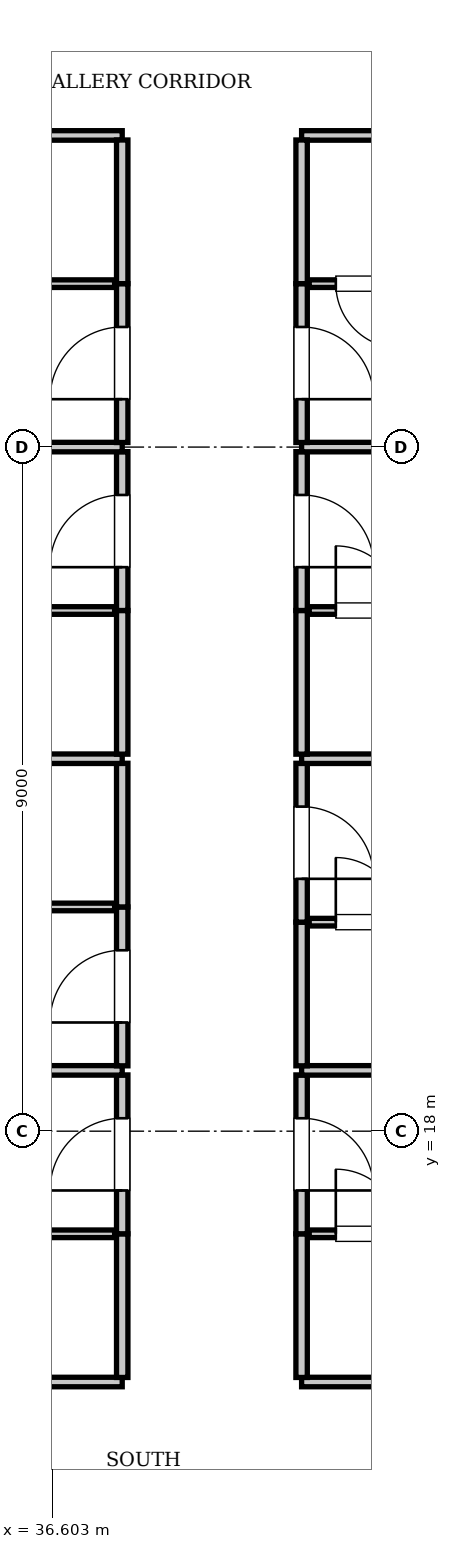
"""IFC4 building model, lengths in metres.
Left out: names, types, materials, properties, quantities, classifications, styles, units other than length and angle.
Written with IfcOpenShell. Run it as: python <this file> out.ifc"""

import sys

from ifc_helpers import new_model, si_unit, direction, frame, frame_2d, origin, place, context, subcontext, project, spatial, rectangle, extrude, element, fill, save


model = new_model("IFC4")
c1 = context("Model", 3, precision=1e-05, world=origin(), true_north=direction((0.0, 1.0)))
c2 = subcontext(c1, "Body", "Model", "MODEL_VIEW")
j1 = project(units=[si_unit("LENGTHUNIT", "METRE"), si_unit("PLANEANGLEUNIT", "RADIAN")], contexts=[c1])
p1 = place(None, origin())
s1 = spatial("IfcSite", under=j1, at=p1, CompositionType="ELEMENT")
p2 = place(p1, origin())
s2 = spatial("IfcBuilding", under=s1, at=p2, CompositionType="ELEMENT")
p3 = place(p2, frame((0.0, 0.0, 173.6)))
s3 = spatial("IfcBuildingStorey", under=s2, at=p3, CompositionType="ELEMENT", Elevation=173.6)
p4 = place(p3, frame((13.2, 14.7, 0.0), z_axis=(0.0, 0.0, 1.0), x_axis=(1.0, 0.0, 0.0)))
e1 = element("IfcWall", 1, at=p4, inside=s3, PredefinedType="PARTITIONING", context=c2, shape_type="SweptSolid", body=[
    extrude(rectangle(XDim=24.32, YDim=0.125, at=frame_2d((12.16, 0.0))), origin(), (0.0, 0.0, 1.0), 3.61),
])
p5 = place(p3, frame((39.88, 14.7, 0.0), z_axis=(0.0, 0.0, 1.0), x_axis=(1.0, 0.0, 0.0)))
e2 = element("IfcWall", 2, at=p5, inside=s3, PredefinedType="PARTITIONING", context=c2, shape_type="SweptSolid", body=[
    extrude(rectangle(XDim=22.52, YDim=0.125, at=frame_2d((11.26, 0.0))), origin(), (0.0, 0.0, 1.0), 3.61),
])
p6 = place(p3, frame((13.2, 31.1, 0.0), z_axis=(0.0, 0.0, 1.0), x_axis=(1.0, 0.0, 0.0)))
e3 = element("IfcWall", 3, at=p6, inside=s3, PredefinedType="PARTITIONING", context=c2, shape_type="SweptSolid", body=[
    extrude(rectangle(XDim=24.32, YDim=0.125, at=frame_2d((12.16, 0.0))), origin(), (0.0, 0.0, 1.0), 3.61),
])
p7 = place(p3, frame((39.88, 31.1, 0.0), z_axis=(0.0, 0.0, 1.0), x_axis=(1.0, 0.0, 0.0)))
e4 = element("IfcWall", 4, at=p7, inside=s3, PredefinedType="PARTITIONING", context=c2, shape_type="SweptSolid", body=[
    extrude(rectangle(XDim=22.52, YDim=0.125, at=frame_2d((11.26, 0.0))), origin(), (0.0, 0.0, 1.0), 3.61),
])
p8 = place(p3, frame((37.52, 14.76, 0.0), z_axis=(0.0, 0.0, 1.0), x_axis=(0.0, 1.0, 0.0)))
e5 = element("IfcWall", 5, at=p8, inside=s3, PredefinedType="PARTITIONING", context=c2, shape_type="SweptSolid", body=[
    extrude(rectangle(XDim=1.89, YDim=0.15, at=frame_2d((0.945, 0.0))), origin(), (0.0, 0.0, 1.0), 3.61),
])
p9 = place(p3, frame((37.52, 16.65, 0.0), z_axis=(0.0, 0.0, 1.0), x_axis=(0.0, 1.0, 0.0)))
e6 = element("IfcWall", 6, at=p9, inside=s3, PredefinedType="PARTITIONING", context=c2, shape_type="SweptSolid", body=[
    extrude(rectangle(XDim=2.09, YDim=0.15, at=frame_2d((1.045, 0.0))), origin(), (0.0, 0.0, 1.0), 3.61),
])
p10 = place(p9, frame((0.57, 0.0, 0.0)))
e7 = element("IfcOpeningElement", 7, at=p10, cuts=e6, PredefinedType="OPENING", context=c2, shape_type="SweptSolid", body=[
    extrude(rectangle(XDim=0.95, YDim=2.15, at=frame_2d((0.475, 1.075))), frame((0.0, 0.085, 0.0), z_axis=(0.0, -1.0, 0.0), x_axis=(1.0, 0.0, 0.0)), (0.0, 0.0, 1.0), 0.17),
])
p11 = place(p3, frame((35.12, 16.65, 0.0), z_axis=(0.0, 0.0, 1.0), x_axis=(1.0, 0.0, 0.0)))
e8 = element("IfcWall", 8, at=p11, inside=s3, PredefinedType="PARTITIONING", context=c2, shape_type="SweptSolid", body=[
    extrude(rectangle(XDim=2.3, YDim=0.1, at=frame_2d((1.15, 0.0))), origin(), (0.0, 0.0, 1.0), 3.61),
])
p12 = place(p11, frame((0.35, 0.0, 0.0)))
e9 = element("IfcOpeningElement", 9, at=p12, cuts=e8, PredefinedType="OPENING", context=c2, shape_type="SweptSolid", body=[
    extrude(rectangle(XDim=0.85, YDim=2.1, at=frame_2d((0.425, 1.05))), frame((0.0, 0.06, 0.0), z_axis=(0.0, -1.0, 0.0), x_axis=(1.0, 0.0, 0.0)), (0.0, 0.0, 1.0), 0.12),
])
p13 = place(p3, frame((39.88, 14.76, 0.0), z_axis=(0.0, 0.0, 1.0), x_axis=(0.0, 1.0, 0.0)))
e10 = element("IfcWall", 10, at=p13, inside=s3, PredefinedType="PARTITIONING", context=c2, shape_type="SweptSolid", body=[
    extrude(rectangle(XDim=1.89, YDim=0.15, at=frame_2d((0.945, 0.0))), origin(), (0.0, 0.0, 1.0), 3.61),
])
p14 = place(p3, frame((39.88, 16.65, 0.0), z_axis=(0.0, 0.0, 1.0), x_axis=(0.0, 1.0, 0.0)))
e11 = element("IfcWall", 11, at=p14, inside=s3, PredefinedType="PARTITIONING", context=c2, shape_type="SweptSolid", body=[
    extrude(rectangle(XDim=2.09, YDim=0.15, at=frame_2d((1.045, 0.0))), origin(), (0.0, 0.0, 1.0), 3.61),
])
p15 = place(p14, frame((0.57, 0.0, 0.0)))
e12 = element("IfcOpeningElement", 12, at=p15, cuts=e11, PredefinedType="OPENING", context=c2, shape_type="SweptSolid", body=[
    extrude(rectangle(XDim=0.95, YDim=2.15, at=frame_2d((0.475, 1.075))), frame((0.0, 0.085, 0.0), z_axis=(0.0, -1.0, 0.0), x_axis=(1.0, 0.0, 0.0)), (0.0, 0.0, 1.0), 0.17),
])
p16 = place(p3, frame((39.98, 16.65, 0.0), z_axis=(0.0, 0.0, 1.0), x_axis=(1.0, 0.0, 0.0)))
e13 = element("IfcWall", 13, at=p16, inside=s3, PredefinedType="PARTITIONING", context=c2, shape_type="SweptSolid", body=[
    extrude(rectangle(XDim=2.3, YDim=0.1, at=frame_2d((1.15, 0.0))), origin(), (0.0, 0.0, 1.0), 3.61),
])
p17 = place(p16, frame((0.35, 0.0, 0.0)))
e14 = element("IfcOpeningElement", 14, at=p17, cuts=e13, PredefinedType="OPENING", context=c2, shape_type="SweptSolid", body=[
    extrude(rectangle(XDim=0.85, YDim=2.1, at=frame_2d((0.425, 1.05))), frame((0.0, 0.06, 0.0), z_axis=(0.0, -1.0, 0.0), x_axis=(1.0, 0.0, 0.0)), (0.0, 0.0, 1.0), 0.12),
])
p18 = place(p3, frame((13.2, 18.8, 0.0), z_axis=(0.0, 0.0, 1.0), x_axis=(1.0, 0.0, 0.0)))
e15 = element("IfcWall", 15, at=p18, inside=s3, PredefinedType="PARTITIONING", context=c2, shape_type="SweptSolid", body=[
    extrude(rectangle(XDim=24.32, YDim=0.125, at=frame_2d((12.16, 0.0))), origin(), (0.0, 0.0, 1.0), 3.61),
])
p19 = place(p3, frame((39.88, 18.8, 0.0), z_axis=(0.0, 0.0, 1.0), x_axis=(1.0, 0.0, 0.0)))
e16 = element("IfcWall", 16, at=p19, inside=s3, PredefinedType="PARTITIONING", context=c2, shape_type="SweptSolid", body=[
    extrude(rectangle(XDim=22.52, YDim=0.125, at=frame_2d((11.26, 0.0))), origin(), (0.0, 0.0, 1.0), 3.61),
])
p20 = place(p3, frame((37.52, 18.86, 0.0), z_axis=(0.0, 0.0, 1.0), x_axis=(0.0, 1.0, 0.0)))
e17 = element("IfcWall", 17, at=p20, inside=s3, PredefinedType="PARTITIONING", context=c2, shape_type="SweptSolid", body=[
    extrude(rectangle(XDim=2.09, YDim=0.15, at=frame_2d((1.045, 0.0))), origin(), (0.0, 0.0, 1.0), 3.61),
])
p21 = place(p20, frame((0.57, 0.0, 0.0)))
e18 = element("IfcOpeningElement", 18, at=p21, cuts=e17, PredefinedType="OPENING", context=c2, shape_type="SweptSolid", body=[
    extrude(rectangle(XDim=0.95, YDim=2.15, at=frame_2d((0.475, 1.075))), frame((0.0, 0.085, 0.0), z_axis=(0.0, -1.0, 0.0), x_axis=(1.0, 0.0, 0.0)), (0.0, 0.0, 1.0), 0.17),
])
p22 = place(p3, frame((37.52, 20.95, 0.0), z_axis=(0.0, 0.0, 1.0), x_axis=(0.0, 1.0, 0.0)))
e19 = element("IfcWall", 19, at=p22, inside=s3, PredefinedType="PARTITIONING", context=c2, shape_type="SweptSolid", body=[
    extrude(rectangle(XDim=1.89, YDim=0.15, at=frame_2d((0.945, 0.0))), origin(), (0.0, 0.0, 1.0), 3.61),
])
p23 = place(p3, frame((35.12, 20.95, 0.0), z_axis=(0.0, 0.0, 1.0), x_axis=(1.0, 0.0, 0.0)))
e20 = element("IfcWall", 20, at=p23, inside=s3, PredefinedType="PARTITIONING", context=c2, shape_type="SweptSolid", body=[
    extrude(rectangle(XDim=2.3, YDim=0.1, at=frame_2d((1.15, 0.0))), origin(), (0.0, 0.0, 1.0), 3.61),
])
p24 = place(p23, frame((0.35, 0.0, 0.0)))
e21 = element("IfcOpeningElement", 21, at=p24, cuts=e20, PredefinedType="OPENING", context=c2, shape_type="SweptSolid", body=[
    extrude(rectangle(XDim=0.85, YDim=2.1, at=frame_2d((0.425, 1.05))), frame((0.0, 0.06, 0.0), z_axis=(0.0, -1.0, 0.0), x_axis=(1.0, 0.0, 0.0)), (0.0, 0.0, 1.0), 0.12),
])
p25 = place(p3, frame((39.88, 18.86, 0.0), z_axis=(0.0, 0.0, 1.0), x_axis=(0.0, 1.0, 0.0)))
e22 = element("IfcWall", 22, at=p25, inside=s3, PredefinedType="PARTITIONING", context=c2, shape_type="SweptSolid", body=[
    extrude(rectangle(XDim=1.89, YDim=0.15, at=frame_2d((0.945, 0.0))), origin(), (0.0, 0.0, 1.0), 3.61),
])
p26 = place(p3, frame((39.88, 20.75, 0.0), z_axis=(0.0, 0.0, 1.0), x_axis=(0.0, 1.0, 0.0)))
e23 = element("IfcWall", 23, at=p26, inside=s3, PredefinedType="PARTITIONING", context=c2, shape_type="SweptSolid", body=[
    extrude(rectangle(XDim=2.09, YDim=0.15, at=frame_2d((1.045, 0.0))), origin(), (0.0, 0.0, 1.0), 3.61),
])
p27 = place(p26, frame((0.57, 0.0, 0.0)))
e24 = element("IfcOpeningElement", 24, at=p27, cuts=e23, PredefinedType="OPENING", context=c2, shape_type="SweptSolid", body=[
    extrude(rectangle(XDim=0.95, YDim=2.15, at=frame_2d((0.475, 1.075))), frame((0.0, 0.085, 0.0), z_axis=(0.0, -1.0, 0.0), x_axis=(1.0, 0.0, 0.0)), (0.0, 0.0, 1.0), 0.17),
])
p28 = place(p3, frame((39.98, 20.75, 0.0), z_axis=(0.0, 0.0, 1.0), x_axis=(1.0, 0.0, 0.0)))
e25 = element("IfcWall", 25, at=p28, inside=s3, PredefinedType="PARTITIONING", context=c2, shape_type="SweptSolid", body=[
    extrude(rectangle(XDim=2.3, YDim=0.1, at=frame_2d((1.15, 0.0))), origin(), (0.0, 0.0, 1.0), 3.61),
])
p29 = place(p28, frame((0.35, 0.0, 0.0)))
e26 = element("IfcOpeningElement", 26, at=p29, cuts=e25, PredefinedType="OPENING", context=c2, shape_type="SweptSolid", body=[
    extrude(rectangle(XDim=0.85, YDim=2.1, at=frame_2d((0.425, 1.05))), frame((0.0, 0.06, 0.0), z_axis=(0.0, -1.0, 0.0), x_axis=(1.0, 0.0, 0.0)), (0.0, 0.0, 1.0), 0.12),
])
p30 = place(p3, frame((13.2, 22.9, 0.0), z_axis=(0.0, 0.0, 1.0), x_axis=(1.0, 0.0, 0.0)))
e27 = element("IfcWall", 27, at=p30, inside=s3, PredefinedType="PARTITIONING", context=c2, shape_type="SweptSolid", body=[
    extrude(rectangle(XDim=24.32, YDim=0.125, at=frame_2d((12.16, 0.0))), origin(), (0.0, 0.0, 1.0), 3.61),
])
p31 = place(p3, frame((39.88, 22.9, 0.0), z_axis=(0.0, 0.0, 1.0), x_axis=(1.0, 0.0, 0.0)))
e28 = element("IfcWall", 28, at=p31, inside=s3, PredefinedType="PARTITIONING", context=c2, shape_type="SweptSolid", body=[
    extrude(rectangle(XDim=22.52, YDim=0.125, at=frame_2d((11.26, 0.0))), origin(), (0.0, 0.0, 1.0), 3.61),
])
p32 = place(p3, frame((37.52, 22.96, 0.0), z_axis=(0.0, 0.0, 1.0), x_axis=(0.0, 1.0, 0.0)))
e29 = element("IfcWall", 29, at=p32, inside=s3, PredefinedType="PARTITIONING", context=c2, shape_type="SweptSolid", body=[
    extrude(rectangle(XDim=1.89, YDim=0.15, at=frame_2d((0.945, 0.0))), origin(), (0.0, 0.0, 1.0), 3.61),
])
p33 = place(p3, frame((37.52, 24.85, 0.0), z_axis=(0.0, 0.0, 1.0), x_axis=(0.0, 1.0, 0.0)))
e30 = element("IfcWall", 30, at=p33, inside=s3, PredefinedType="PARTITIONING", context=c2, shape_type="SweptSolid", body=[
    extrude(rectangle(XDim=2.09, YDim=0.15, at=frame_2d((1.045, 0.0))), origin(), (0.0, 0.0, 1.0), 3.61),
])
p34 = place(p33, frame((0.57, 0.0, 0.0)))
e31 = element("IfcOpeningElement", 31, at=p34, cuts=e30, PredefinedType="OPENING", context=c2, shape_type="SweptSolid", body=[
    extrude(rectangle(XDim=0.95, YDim=2.15, at=frame_2d((0.475, 1.075))), frame((0.0, 0.085, 0.0), z_axis=(0.0, -1.0, 0.0), x_axis=(1.0, 0.0, 0.0)), (0.0, 0.0, 1.0), 0.17),
])
p35 = place(p3, frame((35.12, 24.85, 0.0), z_axis=(0.0, 0.0, 1.0), x_axis=(1.0, 0.0, 0.0)))
e32 = element("IfcWall", 32, at=p35, inside=s3, PredefinedType="PARTITIONING", context=c2, shape_type="SweptSolid", body=[
    extrude(rectangle(XDim=2.3, YDim=0.1, at=frame_2d((1.15, 0.0))), origin(), (0.0, 0.0, 1.0), 3.61),
])
p36 = place(p35, frame((0.35, 0.0, 0.0)))
e33 = element("IfcOpeningElement", 33, at=p36, cuts=e32, PredefinedType="OPENING", context=c2, shape_type="SweptSolid", body=[
    extrude(rectangle(XDim=0.85, YDim=2.1, at=frame_2d((0.425, 1.05))), frame((0.0, 0.06, 0.0), z_axis=(0.0, -1.0, 0.0), x_axis=(1.0, 0.0, 0.0)), (0.0, 0.0, 1.0), 0.12),
])
p37 = place(p3, frame((39.88, 22.96, 0.0), z_axis=(0.0, 0.0, 1.0), x_axis=(0.0, 1.0, 0.0)))
e34 = element("IfcWall", 34, at=p37, inside=s3, PredefinedType="PARTITIONING", context=c2, shape_type="SweptSolid", body=[
    extrude(rectangle(XDim=1.89, YDim=0.15, at=frame_2d((0.945, 0.0))), origin(), (0.0, 0.0, 1.0), 3.61),
])
p38 = place(p3, frame((39.88, 24.85, 0.0), z_axis=(0.0, 0.0, 1.0), x_axis=(0.0, 1.0, 0.0)))
e35 = element("IfcWall", 35, at=p38, inside=s3, PredefinedType="PARTITIONING", context=c2, shape_type="SweptSolid", body=[
    extrude(rectangle(XDim=2.09, YDim=0.15, at=frame_2d((1.045, 0.0))), origin(), (0.0, 0.0, 1.0), 3.61),
])
p39 = place(p38, frame((0.57, 0.0, 0.0)))
e36 = element("IfcOpeningElement", 36, at=p39, cuts=e35, PredefinedType="OPENING", context=c2, shape_type="SweptSolid", body=[
    extrude(rectangle(XDim=0.95, YDim=2.15, at=frame_2d((0.475, 1.075))), frame((0.0, 0.085, 0.0), z_axis=(0.0, -1.0, 0.0), x_axis=(1.0, 0.0, 0.0)), (0.0, 0.0, 1.0), 0.17),
])
p40 = place(p3, frame((39.98, 24.85, 0.0), z_axis=(0.0, 0.0, 1.0), x_axis=(1.0, 0.0, 0.0)))
e37 = element("IfcWall", 37, at=p40, inside=s3, PredefinedType="PARTITIONING", context=c2, shape_type="SweptSolid", body=[
    extrude(rectangle(XDim=2.3, YDim=0.1, at=frame_2d((1.15, 0.0))), origin(), (0.0, 0.0, 1.0), 3.61),
])
p41 = place(p40, frame((0.35, 0.0, 0.0)))
e38 = element("IfcOpeningElement", 38, at=p41, cuts=e37, PredefinedType="OPENING", context=c2, shape_type="SweptSolid", body=[
    extrude(rectangle(XDim=0.85, YDim=2.1, at=frame_2d((0.425, 1.05))), frame((0.0, 0.06, 0.0), z_axis=(0.0, -1.0, 0.0), x_axis=(1.0, 0.0, 0.0)), (0.0, 0.0, 1.0), 0.12),
])
p42 = place(p3, frame((13.2, 27.0, 0.0), z_axis=(0.0, 0.0, 1.0), x_axis=(1.0, 0.0, 0.0)))
e39 = element("IfcWall", 39, at=p42, inside=s3, PredefinedType="PARTITIONING", context=c2, shape_type="SweptSolid", body=[
    extrude(rectangle(XDim=24.32, YDim=0.125, at=frame_2d((12.16, 0.0))), origin(), (0.0, 0.0, 1.0), 2.41),
])
p43 = place(p3, frame((39.88, 27.0, 0.0), z_axis=(0.0, 0.0, 1.0), x_axis=(1.0, 0.0, 0.0)))
e40 = element("IfcWall", 40, at=p43, inside=s3, PredefinedType="PARTITIONING", context=c2, shape_type="SweptSolid", body=[
    extrude(rectangle(XDim=22.52, YDim=0.125, at=frame_2d((11.26, 0.0))), origin(), (0.0, 0.0, 1.0), 2.41),
])
p44 = place(p3, frame((37.52, 27.06, 0.0), z_axis=(0.0, 0.0, 1.0), x_axis=(0.0, 1.0, 0.0)))
e41 = element("IfcWall", 41, at=p44, inside=s3, PredefinedType="PARTITIONING", context=c2, shape_type="SweptSolid", body=[
    extrude(rectangle(XDim=2.09, YDim=0.15, at=frame_2d((1.045, 0.0))), origin(), (0.0, 0.0, 1.0), 3.61),
])
p45 = place(p44, frame((0.57, 0.0, 0.0)))
e42 = element("IfcOpeningElement", 42, at=p45, cuts=e41, PredefinedType="OPENING", context=c2, shape_type="SweptSolid", body=[
    extrude(rectangle(XDim=0.95, YDim=2.15, at=frame_2d((0.475, 1.075))), frame((0.0, 0.085, 0.0), z_axis=(0.0, -1.0, 0.0), x_axis=(1.0, 0.0, 0.0)), (0.0, 0.0, 1.0), 0.17),
])
p46 = place(p3, frame((37.52, 29.15, 0.0), z_axis=(0.0, 0.0, 1.0), x_axis=(0.0, 1.0, 0.0)))
e43 = element("IfcWall", 43, at=p46, inside=s3, PredefinedType="PARTITIONING", context=c2, shape_type="SweptSolid", body=[
    extrude(rectangle(XDim=1.89, YDim=0.15, at=frame_2d((0.945, 0.0))), origin(), (0.0, 0.0, 1.0), 3.61),
])
p47 = place(p3, frame((35.12, 29.15, 0.0), z_axis=(0.0, 0.0, 1.0), x_axis=(1.0, 0.0, 0.0)))
e44 = element("IfcWall", 44, at=p47, inside=s3, PredefinedType="PARTITIONING", context=c2, shape_type="SweptSolid", body=[
    extrude(rectangle(XDim=2.3, YDim=0.1, at=frame_2d((1.15, 0.0))), origin(), (0.0, 0.0, 1.0), 3.61),
])
p48 = place(p47, frame((0.35, 0.0, 0.0)))
e45 = element("IfcOpeningElement", 45, at=p48, cuts=e44, PredefinedType="OPENING", context=c2, shape_type="SweptSolid", body=[
    extrude(rectangle(XDim=0.85, YDim=2.1, at=frame_2d((0.425, 1.05))), frame((0.0, 0.06, 0.0), z_axis=(0.0, -1.0, 0.0), x_axis=(1.0, 0.0, 0.0)), (0.0, 0.0, 1.0), 0.12),
])
p49 = place(p3, frame((39.88, 27.06, 0.0), z_axis=(0.0, 0.0, 1.0), x_axis=(0.0, 1.0, 0.0)))
e46 = element("IfcWall", 46, at=p49, inside=s3, PredefinedType="PARTITIONING", context=c2, shape_type="SweptSolid", body=[
    extrude(rectangle(XDim=2.09, YDim=0.15, at=frame_2d((1.045, 0.0))), origin(), (0.0, 0.0, 1.0), 3.61),
])
p50 = place(p49, frame((0.57, 0.0, 0.0)))
e47 = element("IfcOpeningElement", 47, at=p50, cuts=e46, PredefinedType="OPENING", context=c2, shape_type="SweptSolid", body=[
    extrude(rectangle(XDim=0.95, YDim=2.15, at=frame_2d((0.475, 1.075))), frame((0.0, 0.085, 0.0), z_axis=(0.0, -1.0, 0.0), x_axis=(1.0, 0.0, 0.0)), (0.0, 0.0, 1.0), 0.17),
])
p51 = place(p3, frame((39.88, 29.15, 0.0), z_axis=(0.0, 0.0, 1.0), x_axis=(0.0, 1.0, 0.0)))
e48 = element("IfcWall", 48, at=p51, inside=s3, PredefinedType="PARTITIONING", context=c2, shape_type="SweptSolid", body=[
    extrude(rectangle(XDim=1.89, YDim=0.15, at=frame_2d((0.945, 0.0))), origin(), (0.0, 0.0, 1.0), 3.61),
])
p52 = place(p3, frame((39.98, 29.15, 0.0), z_axis=(0.0, 0.0, 1.0), x_axis=(1.0, 0.0, 0.0)))
e49 = element("IfcWall", 49, at=p52, inside=s3, PredefinedType="PARTITIONING", context=c2, shape_type="SweptSolid", body=[
    extrude(rectangle(XDim=2.3, YDim=0.1, at=frame_2d((1.15, 0.0))), origin(), (0.0, 0.0, 1.0), 3.61),
])
p53 = place(p52, frame((0.35, 0.0, 0.0)))
e50 = element("IfcOpeningElement", 50, at=p53, cuts=e49, PredefinedType="OPENING", context=c2, shape_type="SweptSolid", body=[
    extrude(rectangle(XDim=0.85, YDim=2.1, at=frame_2d((0.425, 1.05))), frame((0.0, 0.06, 0.0), z_axis=(0.0, -1.0, 0.0), x_axis=(1.0, 0.0, 0.0)), (0.0, 0.0, 1.0), 0.12),
])
p54 = place(p10, origin())
e51 = element("IfcDoor", 51, at=p54, inside=s3, OperationType="SINGLE_SWING_LEFT", PredefinedType="DOOR", context=c2, shape_type="SweptSolid", body=[
    extrude(rectangle(XDim=0.95, YDim=2.15, at=frame_2d((0.475, 1.075))), frame((0.0, 0.025, 0.0), z_axis=(0.0, -1.0, 0.0), x_axis=(1.0, 0.0, 0.0)), (0.0, 0.0, 1.0), 0.05),
])
fill(e7, e51)
p55 = place(p17, origin())
e52 = element("IfcDoor", 52, at=p55, inside=s3, OperationType="SINGLE_SWING_LEFT", PredefinedType="DOOR", context=c2, shape_type="SweptSolid", body=[
    extrude(rectangle(XDim=0.85, YDim=2.1, at=frame_2d((0.425, 1.05))), frame((0.0, 0.025, 0.0), z_axis=(0.0, -1.0, 0.0), x_axis=(1.0, 0.0, 0.0)), (0.0, 0.0, 1.0), 0.05),
])
fill(e14, e52)
p56 = place(p15, frame((0.95, 0.0, 0.0), z_axis=(0.0, 0.0, 1.0), x_axis=(-1.0, 0.0, 0.0)))
e53 = element("IfcDoor", 53, at=p56, inside=s3, OperationType="SINGLE_SWING_RIGHT", PredefinedType="DOOR", context=c2, shape_type="SweptSolid", body=[
    extrude(rectangle(XDim=0.95, YDim=2.15, at=frame_2d((0.475, 1.075))), frame((0.0, 0.025, 0.0), z_axis=(0.0, -1.0, 0.0), x_axis=(1.0, 0.0, 0.0)), (0.0, 0.0, 1.0), 0.05),
])
fill(e12, e53)
p57 = place(p21, origin())
e54 = element("IfcDoor", 54, at=p57, inside=s3, OperationType="SINGLE_SWING_LEFT", PredefinedType="DOOR", context=c2, shape_type="SweptSolid", body=[
    extrude(rectangle(XDim=0.95, YDim=2.15, at=frame_2d((0.475, 1.075))), frame((0.0, 0.025, 0.0), z_axis=(0.0, -1.0, 0.0), x_axis=(1.0, 0.0, 0.0)), (0.0, 0.0, 1.0), 0.05),
])
fill(e18, e54)
p58 = place(p29, origin())
e55 = element("IfcDoor", 55, at=p58, inside=s3, OperationType="SINGLE_SWING_LEFT", PredefinedType="DOOR", context=c2, shape_type="SweptSolid", body=[
    extrude(rectangle(XDim=0.85, YDim=2.1, at=frame_2d((0.425, 1.05))), frame((0.0, 0.025, 0.0), z_axis=(0.0, -1.0, 0.0), x_axis=(1.0, 0.0, 0.0)), (0.0, 0.0, 1.0), 0.05),
])
fill(e26, e55)
p59 = place(p27, frame((0.95, 0.0, 0.0), z_axis=(0.0, 0.0, 1.0), x_axis=(-1.0, 0.0, 0.0)))
e56 = element("IfcDoor", 56, at=p59, inside=s3, OperationType="SINGLE_SWING_RIGHT", PredefinedType="DOOR", context=c2, shape_type="SweptSolid", body=[
    extrude(rectangle(XDim=0.95, YDim=2.15, at=frame_2d((0.475, 1.075))), frame((0.0, 0.025, 0.0), z_axis=(0.0, -1.0, 0.0), x_axis=(1.0, 0.0, 0.0)), (0.0, 0.0, 1.0), 0.05),
])
fill(e24, e56)
p60 = place(p34, origin())
e57 = element("IfcDoor", 57, at=p60, inside=s3, OperationType="SINGLE_SWING_LEFT", PredefinedType="DOOR", context=c2, shape_type="SweptSolid", body=[
    extrude(rectangle(XDim=0.95, YDim=2.15, at=frame_2d((0.475, 1.075))), frame((0.0, 0.025, 0.0), z_axis=(0.0, -1.0, 0.0), x_axis=(1.0, 0.0, 0.0)), (0.0, 0.0, 1.0), 0.05),
])
fill(e31, e57)
p61 = place(p41, origin())
e58 = element("IfcDoor", 58, at=p61, inside=s3, OperationType="SINGLE_SWING_LEFT", PredefinedType="DOOR", context=c2, shape_type="SweptSolid", body=[
    extrude(rectangle(XDim=0.85, YDim=2.1, at=frame_2d((0.425, 1.05))), frame((0.0, 0.025, 0.0), z_axis=(0.0, -1.0, 0.0), x_axis=(1.0, 0.0, 0.0)), (0.0, 0.0, 1.0), 0.05),
])
fill(e38, e58)
p62 = place(p39, frame((0.95, 0.0, 0.0), z_axis=(0.0, 0.0, 1.0), x_axis=(-1.0, 0.0, 0.0)))
e59 = element("IfcDoor", 59, at=p62, inside=s3, OperationType="SINGLE_SWING_RIGHT", PredefinedType="DOOR", context=c2, shape_type="SweptSolid", body=[
    extrude(rectangle(XDim=0.95, YDim=2.15, at=frame_2d((0.475, 1.075))), frame((0.0, 0.025, 0.0), z_axis=(0.0, -1.0, 0.0), x_axis=(1.0, 0.0, 0.0)), (0.0, 0.0, 1.0), 0.05),
])
fill(e36, e59)
p63 = place(p45, origin())
e60 = element("IfcDoor", 60, at=p63, inside=s3, OperationType="SINGLE_SWING_LEFT", PredefinedType="DOOR", context=c2, shape_type="SweptSolid", body=[
    extrude(rectangle(XDim=0.95, YDim=2.15, at=frame_2d((0.475, 1.075))), frame((0.0, 0.025, 0.0), z_axis=(0.0, -1.0, 0.0), x_axis=(1.0, 0.0, 0.0)), (0.0, 0.0, 1.0), 0.05),
])
fill(e42, e60)
p64 = place(p53, frame((0.85, 0.0, 0.0), z_axis=(0.0, 0.0, 1.0), x_axis=(-1.0, 0.0, 0.0)))
e61 = element("IfcDoor", 61, at=p64, inside=s3, OperationType="SINGLE_SWING_LEFT", PredefinedType="DOOR", context=c2, shape_type="SweptSolid", body=[
    extrude(rectangle(XDim=0.85, YDim=2.1, at=frame_2d((0.425, 1.05))), frame((0.0, 0.025, 0.0), z_axis=(0.0, -1.0, 0.0), x_axis=(1.0, 0.0, 0.0)), (0.0, 0.0, 1.0), 0.05),
])
fill(e50, e61)
p65 = place(p50, frame((0.95, 0.0, 0.0), z_axis=(0.0, 0.0, 1.0), x_axis=(-1.0, 0.0, 0.0)))
e62 = element("IfcDoor", 62, at=p65, inside=s3, OperationType="SINGLE_SWING_RIGHT", PredefinedType="DOOR", context=c2, shape_type="SweptSolid", body=[
    extrude(rectangle(XDim=0.95, YDim=2.15, at=frame_2d((0.475, 1.075))), frame((0.0, 0.025, 0.0), z_axis=(0.0, -1.0, 0.0), x_axis=(1.0, 0.0, 0.0)), (0.0, 0.0, 1.0), 0.05),
])
fill(e47, e62)
save(model, sys.argv[1])
